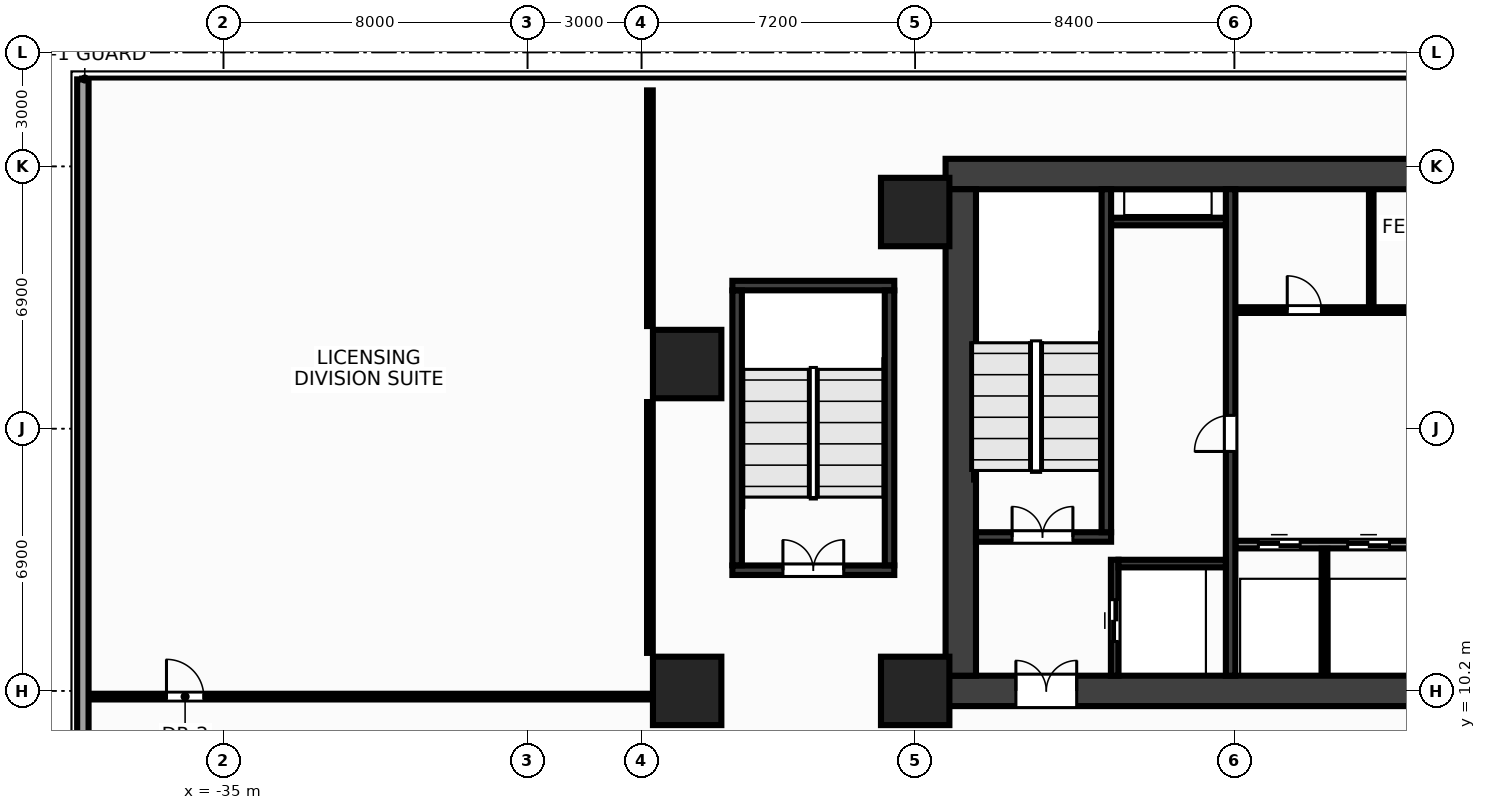
"""IFC4 building model, lengths in metres.
Left out: names, types, materials, properties, quantities, classifications, styles, units other than length and angle.
Written with IfcOpenShell. Run it as: python <this file> out.ifc"""

import sys

from ifc_helpers import new_model, si_unit, direction, frame, frame_2d, origin, origin_2d, place, context, subcontext, project, spatial, rectangle, extrude, source, transform, mapped, element, fill, save


model = new_model("IFC4")
c1 = context("Model", 3, precision=1e-05, world=origin(), true_north=direction((0.0, 1.0)))
c2 = subcontext(c1, "Body", "Model", "MODEL_VIEW")
j1 = project(units=[si_unit("LENGTHUNIT", "METRE"), si_unit("PLANEANGLEUNIT", "RADIAN")], contexts=[c1])
p1 = place(None, origin())
s1 = spatial("IfcSite", under=j1, at=p1, CompositionType="ELEMENT")
p2 = place(p1, origin())
s2 = spatial("IfcBuilding", under=s1, at=p2, CompositionType="ELEMENT")
p3 = place(p2, frame((0.0, 0.0, 5.0)))
s3 = spatial("IfcBuildingStorey", under=s2, at=p3, CompositionType="ELEMENT", Elevation=5.0)
m1 = source(origin(), c2, "Body", "SweptSolid", [
    extrude(rectangle(XDim=32.0, YDim=0.8, at=frame_2d((16.0, 0.0))), origin(), (0.0, 0.0, 1.0), 4.65),
])
p4 = place(p3, frame((-16.0, 23.8, 0.0), z_axis=(0.0, 0.0, 1.0), x_axis=(1.0, 0.0, 0.0)))
e1 = element("IfcWall", 1, at=p4, inside=s3, PredefinedType="SHEAR", context=c2, shape_type="MappedRepresentation", body=[
    mapped(m1, transform((0.0, 0.0, 0.0), x_axis=(1.0, 0.0, 0.0), y_axis=(0.0, 1.0, 0.0), z_axis=(0.0, 0.0, 1.0), scale=1.0)),
])
p5 = place(p3, frame((-16.0, 10.2, 0.0), z_axis=(0.0, 0.0, 1.0), x_axis=(1.0, 0.0, 0.0)))
e2 = element("IfcWall", 2, at=p5, inside=s3, PredefinedType="SHEAR", context=c2, shape_type="MappedRepresentation", body=[
    mapped(m1, transform((0.0, 0.0, 0.0), x_axis=(1.0, 0.0, 0.0), y_axis=(0.0, 1.0, 0.0), z_axis=(0.0, 0.0, 1.0), scale=1.0)),
])
p6 = place(p5, frame((1.85, 0.0, 0.0)))
e3 = element("IfcOpeningElement", 3, at=p6, cuts=e2, PredefinedType="OPENING", context=c2, shape_type="SweptSolid", body=[
    extrude(rectangle(XDim=1.6, YDim=2.15, at=frame_2d((0.8, 1.075))), frame((0.0, 0.412, 0.0), z_axis=(0.0, -1.0, 0.0), x_axis=(1.0, 0.0, 0.0)), (0.0, 0.0, 1.0), 0.824),
])
p7 = place(p5, frame((28.55, 0.0, 0.0)))
e4 = element("IfcOpeningElement", 4, at=p7, cuts=e2, PredefinedType="OPENING", context=c2, shape_type="SweptSolid", body=[
    extrude(rectangle(XDim=1.6, YDim=2.15, at=frame_2d((0.8, 1.075))), frame((0.0, 0.412, 0.0), z_axis=(0.0, -1.0, 0.0), x_axis=(1.0, 0.0, 0.0)), (0.0, 0.0, 1.0), 0.824),
])
p8 = place(p5, frame((15.25, 0.0, 0.0)))
e5 = element("IfcOpeningElement", 5, at=p8, cuts=e2, PredefinedType="OPENING", context=c2, shape_type="SweptSolid", body=[
    extrude(rectangle(XDim=1.5, YDim=2.2, at=frame_2d((0.75, 1.1))), frame((0.0, 0.412, 0.0), z_axis=(0.0, -1.0, 0.0), x_axis=(1.0, 0.0, 0.0)), (0.0, 0.0, 1.0), 0.824),
])
m2 = source(origin(), c2, "Body", "SweptSolid", [
    extrude(rectangle(XDim=12.8, YDim=0.8, at=frame_2d((6.4, 0.0))), origin(), (0.0, 0.0, 1.0), 4.65),
])
p9 = place(p3, frame((-15.6, 10.6, 0.0), z_axis=(0.0, 0.0, 1.0), x_axis=(0.0, 1.0, 0.0)))
e6 = element("IfcWall", 6, at=p9, inside=s3, PredefinedType="SHEAR", context=c2, shape_type="MappedRepresentation", body=[
    mapped(m2, transform((0.0, 0.0, 0.0), x_axis=(1.0, 0.0, 0.0), y_axis=(0.0, 1.0, 0.0), z_axis=(0.0, 0.0, 1.0), scale=1.0)),
])
m3 = source(origin(), c2, "Body", "SweptSolid", [
    extrude(rectangle(XDim=12.8, YDim=0.25, at=frame_2d((6.4, 0.0))), origin(), (0.0, 0.0, 1.0), 4.65),
])
p10 = place(p3, frame((-8.5, 10.6, 0.0), z_axis=(0.0, 0.0, 1.0), x_axis=(0.0, 1.0, 0.0)))
e7 = element("IfcWall", 7, at=p10, inside=s3, PredefinedType="SHEAR", context=c2, shape_type="MappedRepresentation", body=[
    mapped(m3, transform((0.0, 0.0, 0.0), x_axis=(1.0, 0.0, 0.0), y_axis=(0.0, 1.0, 0.0), z_axis=(0.0, 0.0, 1.0), scale=1.0)),
])
p11 = place(p10, frame((5.9, 0.0, 0.0)))
e8 = element("IfcOpeningElement", 8, at=p11, cuts=e7, PredefinedType="OPENING", context=c2, shape_type="SweptSolid", body=[
    extrude(rectangle(XDim=0.95, YDim=2.15, at=frame_2d((0.475, 1.075))), frame((0.0, 0.137, 0.0), z_axis=(0.0, -1.0, 0.0), x_axis=(1.0, 0.0, 0.0)), (0.0, 0.0, 1.0), 0.274),
])
m4 = source(origin(), c2, "Body", "SweptSolid", [
    extrude(rectangle(XDim=3.555, YDim=0.25, at=frame_2d((1.777, 0.0))), origin(), (0.0, 0.0, 1.0), 4.65),
])
p12 = place(p3, frame((-15.2, 14.25, 0.0), z_axis=(0.0, 0.0, 1.0), x_axis=(1.0, 0.0, 0.0)))
e9 = element("IfcWall", 9, at=p12, inside=s3, PredefinedType="SHEAR", context=c2, shape_type="MappedRepresentation", body=[
    mapped(m4, transform((0.0, 0.0, 0.0), x_axis=(1.0, 0.0, 0.0), y_axis=(0.0, 1.0, 0.0), z_axis=(0.0, 0.0, 1.0), scale=1.0)),
])
p13 = place(p12, frame((0.95, 0.0, 0.0)))
e10 = element("IfcOpeningElement", 10, at=p13, cuts=e9, PredefinedType="OPENING", context=c2, shape_type="SweptSolid", body=[
    extrude(rectangle(XDim=1.6, YDim=2.15, at=frame_2d((0.8, 1.075))), frame((0.0, 0.137, 0.0), z_axis=(0.0, -1.0, 0.0), x_axis=(1.0, 0.0, 0.0)), (0.0, 0.0, 1.0), 0.274),
])
m5 = source(origin(), c2, "Body", "SweptSolid", [
    extrude(rectangle(XDim=9.025, YDim=0.25, at=frame_2d((4.512, 0.0))), origin(), (0.0, 0.0, 1.0), 4.65),
])
p14 = place(p3, frame((-11.77, 14.375, 0.0), z_axis=(0.0, 0.0, 1.0), x_axis=(0.0, 1.0, 0.0)))
e11 = element("IfcWall", 11, at=p14, inside=s3, PredefinedType="SHEAR", context=c2, shape_type="MappedRepresentation", body=[
    mapped(m5, transform((0.0, 0.0, 0.0), x_axis=(1.0, 0.0, 0.0), y_axis=(0.0, 1.0, 0.0), z_axis=(0.0, 0.0, 1.0), scale=1.0)),
])
m6 = source(origin(), c2, "Body", "SweptSolid", [
    extrude(rectangle(XDim=3.05, YDim=0.2, at=frame_2d((1.525, 0.0))), origin(), (0.0, 0.0, 1.0), 4.65),
])
p15 = place(p3, frame((-11.55, 10.6, 0.0), z_axis=(0.0, 0.0, 1.0), x_axis=(0.0, 1.0, 0.0)))
e12 = element("IfcWall", 12, at=p15, inside=s3, PredefinedType="SHEAR", context=c2, shape_type="MappedRepresentation", body=[
    mapped(m6, transform((0.0, 0.0, 0.0), x_axis=(1.0, 0.0, 0.0), y_axis=(0.0, 1.0, 0.0), z_axis=(0.0, 0.0, 1.0), scale=1.0)),
])
p16 = place(p15, frame((0.9, 0.0, 0.0)))
e13 = element("IfcOpeningElement", 13, at=p16, cuts=e12, PredefinedType="OPENING", context=c2, shape_type="SweptSolid", body=[
    extrude(rectangle(XDim=1.1, YDim=2.15, at=frame_2d((0.55, 1.075))), frame((0.0, 0.112, 0.0), z_axis=(0.0, -1.0, 0.0), x_axis=(1.0, 0.0, 0.0)), (0.0, 0.0, 1.0), 0.224),
])
m7 = source(origin(), c2, "Body", "SweptSolid", [
    extrude(rectangle(XDim=2.825, YDim=0.2, at=frame_2d((1.413, 0.0))), origin(), (0.0, 0.0, 1.0), 4.65),
])
p17 = place(p3, frame((-11.45, 13.55, 0.0), z_axis=(0.0, 0.0, 1.0), x_axis=(1.0, 0.0, 0.0)))
e14 = element("IfcWall", 14, at=p17, inside=s3, PredefinedType="SHEAR", context=c2, shape_type="MappedRepresentation", body=[
    mapped(m7, transform((0.0, 0.0, 0.0), x_axis=(1.0, 0.0, 0.0), y_axis=(0.0, 1.0, 0.0), z_axis=(0.0, 0.0, 1.0), scale=1.0)),
])
m8 = source(origin(), c2, "Body", "SweptSolid", [
    extrude(rectangle(XDim=3.02, YDim=0.2, at=frame_2d((1.51, 0.0))), origin(), (0.0, 0.0, 1.0), 4.65),
])
p18 = place(p3, frame((-11.645, 22.55, 0.0), z_axis=(0.0, 0.0, 1.0), x_axis=(1.0, 0.0, 0.0)))
e15 = element("IfcWall", 15, at=p18, inside=s3, PredefinedType="SHEAR", context=c2, shape_type="MappedRepresentation", body=[
    mapped(m8, transform((0.0, 0.0, 0.0), x_axis=(1.0, 0.0, 0.0), y_axis=(0.0, 1.0, 0.0), z_axis=(0.0, 0.0, 1.0), scale=1.0)),
])
m9 = source(origin(), c2, "Body", "SweptSolid", [
    extrude(rectangle(XDim=4.26, YDim=0.25, at=frame_2d((2.13, 0.0))), origin(), (0.0, 0.0, 1.0), 4.65),
])
p19 = place(p3, frame((-21.61, 20.865, 0.0), z_axis=(0.0, 0.0, 1.0), x_axis=(1.0, 0.0, 0.0)))
e16 = element("IfcWall", 16, at=p19, inside=s3, PredefinedType="SHEAR", context=c2, shape_type="MappedRepresentation", body=[
    mapped(m9, transform((0.0, 0.0, 0.0), x_axis=(1.0, 0.0, 0.0), y_axis=(0.0, 1.0, 0.0), z_axis=(0.0, 0.0, 1.0), scale=1.0)),
])
p20 = place(p3, frame((-21.61, 13.375, 0.0), z_axis=(0.0, 0.0, 1.0), x_axis=(1.0, 0.0, 0.0)))
e17 = element("IfcWall", 17, at=p20, inside=s3, PredefinedType="SHEAR", context=c2, shape_type="MappedRepresentation", body=[
    mapped(m9, transform((0.0, 0.0, 0.0), x_axis=(1.0, 0.0, 0.0), y_axis=(0.0, 1.0, 0.0), z_axis=(0.0, 0.0, 1.0), scale=1.0)),
])
p21 = place(p20, frame((1.33, 0.0, 0.0)))
e18 = element("IfcOpeningElement", 18, at=p21, cuts=e17, PredefinedType="OPENING", context=c2, shape_type="SweptSolid", body=[
    extrude(rectangle(XDim=1.6, YDim=2.15, at=frame_2d((0.8, 1.075))), frame((0.0, 0.137, 0.0), z_axis=(0.0, -1.0, 0.0), x_axis=(1.0, 0.0, 0.0)), (0.0, 0.0, 1.0), 0.274),
])
m10 = source(origin(), c2, "Body", "SweptSolid", [
    extrude(rectangle(XDim=7.23, YDim=0.25, at=frame_2d((3.615, 0.0))), origin(), (0.0, 0.0, 1.0), 4.65),
])
for number, where, z_axis, x_axis in (
    (19, (-21.485, 13.505, 0.0), (0.0, 0.0, 1.0), (0.0, 1.0, 0.0)),
    (20, (-17.475, 13.505, 0.0), (0.0, 0.0, 1.0), (0.0, 1.0, 0.0)),
):
    element("IfcWall", number, at=place(p3, frame(where, z_axis=z_axis, x_axis=x_axis)), inside=s3, PredefinedType="SHEAR", context=c2, shape_type="MappedRepresentation", body=[
        mapped(m10, transform((0.0, 0.0, 0.0), x_axis=(1.0, 0.0, 0.0), y_axis=(0.0, 1.0, 0.0), z_axis=(0.0, 0.0, 1.0), scale=1.0)),
    ])
m11 = source(origin(), c2, "Body", "SweptSolid", [
    extrude(rectangle(XDim=1.8, YDim=1.8, at=origin_2d()), origin(), (0.0, 0.0, 1.0), 4.65),
])
for number, where, z_axis, x_axis in (
    (21, (-16.8, 10.2, 0.0), (0.0, 0.0, 1.0), (1.0, 0.0, 0.0)),
    (22, (-16.8, 22.8, 0.0), (0.0, 0.0, 1.0), (1.0, 0.0, 0.0)),
    (23, (-22.8, 10.2, 0.0), (0.0, 0.0, 1.0), (1.0, 0.0, 0.0)),
    (24, (-22.8, 18.8, 0.0), (0.0, 0.0, 1.0), (1.0, 0.0, 0.0)),
):
    element("IfcColumn", number, at=place(p3, frame(where, z_axis=z_axis, x_axis=x_axis)), inside=s3, PredefinedType="COLUMN", context=c2, shape_type="MappedRepresentation", body=[
        mapped(m11, transform((0.0, 0.0, 0.0), x_axis=(1.0, 0.0, 0.0), y_axis=(0.0, 1.0, 0.0), z_axis=(0.0, 0.0, 1.0), scale=1.0)),
    ])
m12 = source(origin(), c2, "Body", "SweptSolid", [
    extrude(rectangle(XDim=55.99, YDim=0.3, at=frame_2d((27.995, 0.0))), origin(), (0.0, 0.0, 1.0), 3.87),
])
p22 = place(p3, frame((-38.7, -29.7, 0.0), z_axis=(0.0, 0.0, 1.0), x_axis=(0.0, 1.0, 0.0)))
e25 = element("IfcWall", 25, at=p22, inside=s3, PredefinedType="STANDARD", context=c2, shape_type="MappedRepresentation", body=[
    mapped(m12, transform((0.0, 0.0, 0.0), x_axis=(1.0, 0.0, 0.0), y_axis=(0.0, 1.0, 0.0), z_axis=(0.0, 0.0, 1.0), scale=1.0)),
])
m13 = source(origin(), c2, "Body", "SweptSolid", [
    extrude(rectangle(XDim=7.07, YDim=0.2, at=frame_2d((3.535, 0.0))), origin(), (0.0, 0.0, 1.0), 4.37),
])
p23 = place(p3, frame((-8.37, 14.05, 0.0), z_axis=(0.0, 0.0, 1.0), x_axis=(1.0, 0.0, 0.0)))
e26 = element("IfcWall", 26, at=p23, inside=s3, PredefinedType="PARTITIONING", context=c2, shape_type="MappedRepresentation", body=[
    mapped(m13, transform((0.0, 0.0, 0.0), x_axis=(1.0, 0.0, 0.0), y_axis=(0.0, 1.0, 0.0), z_axis=(0.0, 0.0, 1.0), scale=1.0)),
])
p24 = place(p23, frame((0.6, 0.0, 0.0)))
e27 = element("IfcOpeningElement", 27, at=p24, cuts=e26, PredefinedType="OPENING", context=c2, shape_type="SweptSolid", body=[
    extrude(rectangle(XDim=1.1, YDim=2.15, at=frame_2d((0.55, 1.075))), frame((0.0, 0.112, 0.0), z_axis=(0.0, -1.0, 0.0), x_axis=(1.0, 0.0, 0.0)), (0.0, 0.0, 1.0), 0.224),
])
p25 = place(p23, frame((2.95, 0.0, 0.0)))
e28 = element("IfcOpeningElement", 28, at=p25, cuts=e26, PredefinedType="OPENING", context=c2, shape_type="SweptSolid", body=[
    extrude(rectangle(XDim=1.1, YDim=2.15, at=frame_2d((0.55, 1.075))), frame((0.0, 0.112, 0.0), z_axis=(0.0, -1.0, 0.0), x_axis=(1.0, 0.0, 0.0)), (0.0, 0.0, 1.0), 0.224),
])
p26 = place(p23, frame((5.3, 0.0, 0.0)))
e29 = element("IfcOpeningElement", 29, at=p26, cuts=e26, PredefinedType="OPENING", context=c2, shape_type="SweptSolid", body=[
    extrude(rectangle(XDim=1.1, YDim=2.15, at=frame_2d((0.55, 1.075))), frame((0.0, 0.112, 0.0), z_axis=(0.0, -1.0, 0.0), x_axis=(1.0, 0.0, 0.0)), (0.0, 0.0, 1.0), 0.224),
])
m14 = source(origin(), c2, "Body", "SweptSolid", [
    extrude(rectangle(XDim=14.59, YDim=0.15, at=frame_2d((7.295, 0.0))), origin(), (0.0, 0.0, 1.0), 4.37),
])
p27 = place(p3, frame((-8.37, 20.22, 0.0), z_axis=(0.0, 0.0, 1.0), x_axis=(1.0, 0.0, 0.0)))
e30 = element("IfcWall", 30, at=p27, inside=s3, PredefinedType="PARTITIONING", context=c2, shape_type="MappedRepresentation", body=[
    mapped(m14, transform((0.0, 0.0, 0.0), x_axis=(1.0, 0.0, 0.0), y_axis=(0.0, 1.0, 0.0), z_axis=(0.0, 0.0, 1.0), scale=1.0)),
])
p28 = place(p27, frame((1.36, 0.0, 0.0)))
e31 = element("IfcOpeningElement", 31, at=p28, cuts=e30, PredefinedType="OPENING", context=c2, shape_type="SweptSolid", body=[
    extrude(rectangle(XDim=0.9, YDim=2.15, at=frame_2d((0.45, 1.075))), frame((0.0, 0.087, 0.0), z_axis=(0.0, -1.0, 0.0), x_axis=(1.0, 0.0, 0.0)), (0.0, 0.0, 1.0), 0.174),
])
p29 = place(p27, frame((4.92, 0.0, 0.0)))
e32 = element("IfcOpeningElement", 32, at=p29, cuts=e30, PredefinedType="OPENING", context=c2, shape_type="SweptSolid", body=[
    extrude(rectangle(XDim=0.9, YDim=2.15, at=frame_2d((0.45, 1.075))), frame((0.0, 0.087, 0.0), z_axis=(0.0, -1.0, 0.0), x_axis=(1.0, 0.0, 0.0)), (0.0, 0.0, 1.0), 0.174),
])
p30 = place(p27, frame((10.37, 0.0, 0.0)))
e33 = element("IfcOpeningElement", 33, at=p30, cuts=e30, PredefinedType="OPENING", context=c2, shape_type="SweptSolid", body=[
    extrude(rectangle(XDim=0.9, YDim=2.15, at=frame_2d((0.45, 1.075))), frame((0.0, 0.087, 0.0), z_axis=(0.0, -1.0, 0.0), x_axis=(1.0, 0.0, 0.0)), (0.0, 0.0, 1.0), 0.174),
])
m15 = source(origin(), c2, "Body", "SweptSolid", [
    extrude(rectangle(XDim=3.34, YDim=0.15, at=frame_2d((1.67, 0.0))), origin(), (0.0, 0.0, 1.0), 4.37),
])
p31 = place(p3, frame((-6.03, 10.6, 0.0), z_axis=(0.0, 0.0, 1.0), x_axis=(0.0, 1.0, 0.0)))
e34 = element("IfcWall", 34, at=p31, inside=s3, PredefinedType="PARTITIONING", context=c2, shape_type="MappedRepresentation", body=[
    mapped(m15, transform((0.0, 0.0, 0.0), x_axis=(1.0, 0.0, 0.0), y_axis=(0.0, 1.0, 0.0), z_axis=(0.0, 0.0, 1.0), scale=1.0)),
])
m16 = source(origin(), c2, "Body", "SweptSolid", [
    extrude(rectangle(XDim=3.04, YDim=0.12, at=frame_2d((1.52, 0.0))), origin(), (0.0, 0.0, 1.0), 4.37),
])
p32 = place(p3, frame((-4.8, 20.32, 0.0), z_axis=(0.0, 0.0, 1.0), x_axis=(0.0, 1.0, 0.0)))
e35 = element("IfcWall", 35, at=p32, inside=s3, PredefinedType="PARTITIONING", context=c2, shape_type="MappedRepresentation", body=[
    mapped(m16, transform((0.0, 0.0, 0.0), x_axis=(1.0, 0.0, 0.0), y_axis=(0.0, 1.0, 0.0), z_axis=(0.0, 0.0, 1.0), scale=1.0)),
])
m17 = source(origin(), c2, "Body", "SweptSolid", [
    extrude(rectangle(XDim=14.7, YDim=0.15, at=frame_2d((7.35, 0.0))), origin(), (0.0, 0.0, 1.0), 4.37),
])
p33 = place(p3, frame((-38.5, 10.05, 0.0), z_axis=(0.0, 0.0, 1.0), x_axis=(1.0, 0.0, 0.0)))
e36 = element("IfcWall", 36, at=p33, inside=s3, PredefinedType="PARTITIONING", context=c2, shape_type="MappedRepresentation", body=[
    mapped(m17, transform((0.0, 0.0, 0.0), x_axis=(1.0, 0.0, 0.0), y_axis=(0.0, 1.0, 0.0), z_axis=(0.0, 0.0, 1.0), scale=1.0)),
])
p34 = place(p33, frame((2.0, 0.0, 0.0)))
e37 = element("IfcOpeningElement", 37, at=p34, cuts=e36, PredefinedType="OPENING", context=c2, shape_type="SweptSolid", body=[
    extrude(rectangle(XDim=0.98, YDim=2.15, at=frame_2d((0.49, 1.075))), frame((0.0, 0.087, 0.0), z_axis=(0.0, -1.0, 0.0), x_axis=(1.0, 0.0, 0.0)), (0.0, 0.0, 1.0), 0.174),
])
m18 = source(origin(), c2, "Body", "SweptSolid", [
    extrude(rectangle(XDim=6.6, YDim=0.15, at=frame_2d((3.3, 0.0))), origin(), (0.0, 0.0, 1.0), 4.37),
])
p35 = place(p3, frame((-23.78, 11.2, 0.0), z_axis=(0.0, 0.0, 1.0), x_axis=(0.0, 1.0, 0.0)))
e38 = element("IfcWall", 38, at=p35, inside=s3, PredefinedType="PARTITIONING", context=c2, shape_type="MappedRepresentation", body=[
    mapped(m18, transform((0.0, 0.0, 0.0), x_axis=(1.0, 0.0, 0.0), y_axis=(0.0, 1.0, 0.0), z_axis=(0.0, 0.0, 1.0), scale=1.0)),
])
m19 = source(origin(), c2, "Body", "SweptSolid", [
    extrude(rectangle(XDim=6.2, YDim=0.15, at=frame_2d((3.1, 0.0))), origin(), (0.0, 0.0, 1.0), 4.37),
])
p36 = place(p3, frame((-23.78, 19.8, 0.0), z_axis=(0.0, 0.0, 1.0), x_axis=(0.0, 1.0, 0.0)))
e39 = element("IfcWall", 39, at=p36, inside=s3, PredefinedType="PARTITIONING", context=c2, shape_type="MappedRepresentation", body=[
    mapped(m19, transform((0.0, 0.0, 0.0), x_axis=(1.0, 0.0, 0.0), y_axis=(0.0, 1.0, 0.0), z_axis=(0.0, 0.0, 1.0), scale=1.0)),
])
m20 = source(origin(), c2, "Body", "SweptSolid", [
    extrude(rectangle(XDim=1.6, YDim=2.15, at=frame_2d((0.8, 1.075))), frame((0.0, 0.025, 0.0), z_axis=(0.0, -1.0, 0.0), x_axis=(1.0, 0.0, 0.0)), (0.0, 0.0, 1.0), 0.05),
])
p37 = place(p13, origin())
e40 = element("IfcDoor", 40, at=p37, inside=s3, OperationType="DOUBLE_DOOR_SINGLE_SWING", PredefinedType="DOOR", context=c2, shape_type="MappedRepresentation", body=[
    mapped(m20, transform((0.0, 0.0, 0.0), x_axis=(1.0, 0.0, 0.0), y_axis=(0.0, 1.0, 0.0), z_axis=(0.0, 0.0, 1.0), scale=1.0)),
])
fill(e10, e40)
p38 = place(p6, origin())
e41 = element("IfcDoor", 41, at=p38, inside=s3, OperationType="DOUBLE_DOOR_SINGLE_SWING", PredefinedType="DOOR", context=c2, shape_type="MappedRepresentation", body=[
    mapped(m20, transform((0.0, 0.0, 0.0), x_axis=(1.0, 0.0, 0.0), y_axis=(0.0, 1.0, 0.0), z_axis=(0.0, 0.0, 1.0), scale=1.0)),
])
fill(e3, e41)
m21 = source(origin(), c2, "Body", "SweptSolid", [
    extrude(rectangle(XDim=1.1, YDim=2.15, at=frame_2d((0.55, 1.075))), frame((0.0, 0.025, 0.0), z_axis=(0.0, -1.0, 0.0), x_axis=(1.0, 0.0, 0.0)), (0.0, 0.0, 1.0), 0.05),
])
p39 = place(p16, origin())
e42 = element("IfcDoor", 42, at=p39, inside=s3, OperationType="DOUBLE_DOOR_SLIDING", PredefinedType="DOOR", context=c2, shape_type="MappedRepresentation", body=[
    mapped(m21, transform((0.0, 0.0, 0.0), x_axis=(1.0, 0.0, 0.0), y_axis=(0.0, 1.0, 0.0), z_axis=(0.0, 0.0, 1.0), scale=1.0)),
])
fill(e13, e42)
p40 = place(p21, origin())
e43 = element("IfcDoor", 43, at=p40, inside=s3, OperationType="DOUBLE_DOOR_SINGLE_SWING", PredefinedType="DOOR", context=c2, shape_type="MappedRepresentation", body=[
    mapped(m20, transform((0.0, 0.0, 0.0), x_axis=(1.0, 0.0, 0.0), y_axis=(0.0, 1.0, 0.0), z_axis=(0.0, 0.0, 1.0), scale=1.0)),
])
fill(e18, e43)
m22 = source(origin(), c2, "Body", "SweptSolid", [
    extrude(rectangle(XDim=0.95, YDim=2.15, at=frame_2d((0.475, 1.075))), frame((0.0, 0.025, 0.0), z_axis=(0.0, -1.0, 0.0), x_axis=(1.0, 0.0, 0.0)), (0.0, 0.0, 1.0), 0.05),
])
p41 = place(p11, origin())
e44 = element("IfcDoor", 44, at=p41, inside=s3, OperationType="SINGLE_SWING_LEFT", PredefinedType="DOOR", context=c2, shape_type="MappedRepresentation", body=[
    mapped(m22, transform((0.0, 0.0, 0.0), x_axis=(1.0, 0.0, 0.0), y_axis=(0.0, 1.0, 0.0), z_axis=(0.0, 0.0, 1.0), scale=1.0)),
])
fill(e8, e44)
p42 = place(p24, origin())
e45 = element("IfcDoor", 45, at=p42, inside=s3, OperationType="DOUBLE_DOOR_SLIDING", PredefinedType="DOOR", context=c2, shape_type="MappedRepresentation", body=[
    mapped(m21, transform((0.0, 0.0, 0.0), x_axis=(1.0, 0.0, 0.0), y_axis=(0.0, 1.0, 0.0), z_axis=(0.0, 0.0, 1.0), scale=1.0)),
])
fill(e27, e45)
p43 = place(p25, origin())
e46 = element("IfcDoor", 46, at=p43, inside=s3, OperationType="DOUBLE_DOOR_SLIDING", PredefinedType="DOOR", context=c2, shape_type="MappedRepresentation", body=[
    mapped(m21, transform((0.0, 0.0, 0.0), x_axis=(1.0, 0.0, 0.0), y_axis=(0.0, 1.0, 0.0), z_axis=(0.0, 0.0, 1.0), scale=1.0)),
])
fill(e28, e46)
m23 = source(origin(), c2, "Body", "SweptSolid", [
    extrude(rectangle(XDim=0.9, YDim=2.15, at=frame_2d((0.45, 1.075))), frame((0.0, 0.025, 0.0), z_axis=(0.0, -1.0, 0.0), x_axis=(1.0, 0.0, 0.0)), (0.0, 0.0, 1.0), 0.05),
])
p44 = place(p28, origin())
e47 = element("IfcDoor", 47, at=p44, inside=s3, OperationType="SINGLE_SWING_LEFT", PredefinedType="DOOR", context=c2, shape_type="MappedRepresentation", body=[
    mapped(m23, transform((0.0, 0.0, 0.0), x_axis=(1.0, 0.0, 0.0), y_axis=(0.0, 1.0, 0.0), z_axis=(0.0, 0.0, 1.0), scale=1.0)),
])
fill(e31, e47)
m24 = source(origin(), c2, "Body", "SweptSolid", [
    extrude(rectangle(XDim=0.98, YDim=2.15, at=frame_2d((0.49, 1.075))), frame((0.0, 0.025, 0.0), z_axis=(0.0, -1.0, 0.0), x_axis=(1.0, 0.0, 0.0)), (0.0, 0.0, 1.0), 0.05),
])
p45 = place(p34, origin())
e48 = element("IfcDoor", 48, at=p45, inside=s3, OperationType="SINGLE_SWING_LEFT", PredefinedType="DOOR", context=c2, shape_type="MappedRepresentation", body=[
    mapped(m24, transform((0.0, 0.0, 0.0), x_axis=(1.0, 0.0, 0.0), y_axis=(0.0, 1.0, 0.0), z_axis=(0.0, 0.0, 1.0), scale=1.0)),
])
fill(e37, e48)
save(model, sys.argv[1])
